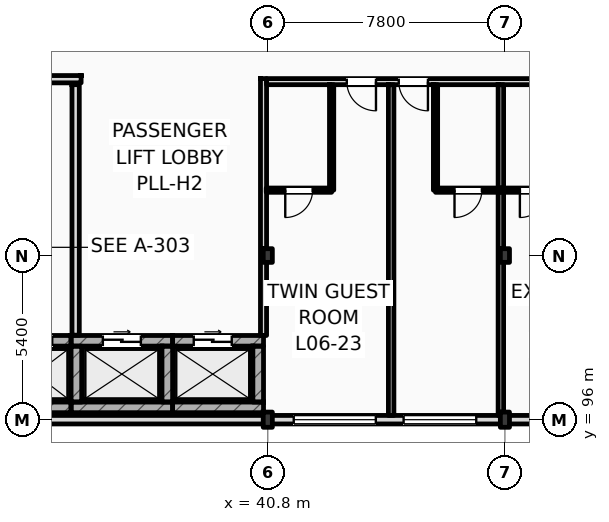
"""IFC4 building model, lengths in metres.
Left out: names, types, materials, properties, quantities, classifications, styles, units other than length and angle.
Written with IfcOpenShell. Run it as: python <this file> out.ifc"""

import sys

from ifc_helpers import new_model, si_unit, direction, frame, frame_2d, origin, origin_2d, place, context, subcontext, project, spatial, rectangle, i_section, extrude, element, fill, save


model = new_model("IFC4")
c1 = context("Model", 3, precision=1e-05, world=origin(), true_north=direction((0.0, 1.0)))
c2 = subcontext(c1, "Body", "Model", "MODEL_VIEW")
j1 = project(units=[si_unit("LENGTHUNIT", "METRE"), si_unit("PLANEANGLEUNIT", "RADIAN")], contexts=[c1])
p1 = place(None, origin())
s1 = spatial("IfcSite", under=j1, at=p1, CompositionType="ELEMENT")
p2 = place(p1, origin())
s2 = spatial("IfcBuilding", under=s1, at=p2, CompositionType="ELEMENT")
p3 = place(p2, frame((0.0, 0.0, 28.2)))
s3 = spatial("IfcBuildingStorey", under=s2, at=p3, CompositionType="ELEMENT", Elevation=28.2)
p4 = place(p3, frame((40.8, 96.0, 0.0), z_axis=(0.0, 0.0, 1.0), x_axis=(1.0, 0.0, 0.0)))
e1 = element("IfcColumn", 1, at=p4, inside=s3, PredefinedType="COLUMN", context=c2, shape_type="SweptSolid", body=[
    extrude(i_section(OverallWidth=0.3, OverallDepth=0.5, WebThickness=0.014, FlangeThickness=0.028, FilletRadius=0.027, at=origin_2d()), origin(), (0.0, 0.0, 1.0), 3.6),
])
p5 = place(p3, frame((40.8, 101.4, 0.0), z_axis=(0.0, 0.0, 1.0), x_axis=(1.0, 0.0, 0.0)))
e2 = element("IfcColumn", 2, at=p5, inside=s3, PredefinedType="COLUMN", context=c2, shape_type="SweptSolid", body=[
    extrude(i_section(OverallWidth=0.3, OverallDepth=0.45, WebThickness=0.014, FlangeThickness=0.026, FilletRadius=0.027, at=origin_2d()), origin(), (0.0, 0.0, 1.0), 3.6),
])
p6 = place(p3, frame((48.6, 96.0, 0.0), z_axis=(0.0, 0.0, 1.0), x_axis=(1.0, 0.0, 0.0)))
e3 = element("IfcColumn", 3, at=p6, inside=s3, PredefinedType="COLUMN", context=c2, shape_type="SweptSolid", body=[
    extrude(i_section(OverallWidth=0.3, OverallDepth=0.5, WebThickness=0.014, FlangeThickness=0.028, FilletRadius=0.027, at=origin_2d()), origin(), (0.0, 0.0, 1.0), 3.6),
])
p7 = place(p3, frame((48.6, 101.4, 0.0), z_axis=(0.0, 0.0, 1.0), x_axis=(1.0, 0.0, 0.0)))
e4 = element("IfcColumn", 4, at=p7, inside=s3, PredefinedType="COLUMN", context=c2, shape_type="SweptSolid", body=[
    extrude(i_section(OverallWidth=0.3, OverallDepth=0.45, WebThickness=0.014, FlangeThickness=0.026, FilletRadius=0.027, at=origin_2d()), origin(), (0.0, 0.0, 1.0), 3.6),
])
p8 = place(p3, frame((25.2, 96.0, 0.0), z_axis=(0.0, 0.0, 1.0), x_axis=(1.0, 0.0, 0.0)))
e5 = element("IfcWall", 5, at=p8, inside=s3, PredefinedType="STANDARD", context=c2, shape_type="SweptSolid", body=[
    extrude(rectangle(XDim=94.8, YDim=0.28, at=frame_2d((47.4, 0.0))), origin(), (0.0, 0.0, 1.0), 2.8),
])
p9 = place(p8, frame((16.454, 0.0, 0.9)))
e6 = element("IfcOpeningElement", 6, at=p9, cuts=e5, PredefinedType="OPENING", context=c2, shape_type="SweptSolid", body=[
    extrude(rectangle(XDim=2.7, YDim=1.72, at=frame_2d((1.35, 0.86))), frame((0.0, 0.15, 0.0), z_axis=(0.0, -1.0, 0.0), x_axis=(1.0, 0.0, 0.0)), (0.0, 0.0, 1.0), 0.3),
])
p10 = place(p8, frame((20.068, 0.0, 0.9)))
e7 = element("IfcOpeningElement", 7, at=p10, cuts=e5, PredefinedType="OPENING", context=c2, shape_type="SweptSolid", body=[
    extrude(rectangle(XDim=2.389, YDim=1.72, at=frame_2d((1.194, 0.86))), frame((0.0, 0.15, 0.0), z_axis=(0.0, -1.0, 0.0), x_axis=(1.0, 0.0, 0.0)), (0.0, 0.0, 1.0), 0.3),
])
p11 = place(p8, frame((24.277, 0.0, 0.9)))
e8 = element("IfcOpeningElement", 8, at=p11, cuts=e5, PredefinedType="OPENING", context=c2, shape_type="SweptSolid", body=[
    extrude(rectangle(XDim=1.8, YDim=1.72, at=frame_2d((0.9, 0.86))), frame((0.0, 0.15, 0.0), z_axis=(0.0, -1.0, 0.0), x_axis=(1.0, 0.0, 0.0)), (0.0, 0.0, 1.0), 0.3),
])
p12 = place(p8, frame((27.885, 0.0, 0.9)))
e9 = element("IfcOpeningElement", 9, at=p12, cuts=e5, PredefinedType="OPENING", context=c2, shape_type="SweptSolid", body=[
    extrude(rectangle(XDim=2.388, YDim=1.72, at=frame_2d((1.194, 0.86))), frame((0.0, 0.15, 0.0), z_axis=(0.0, -1.0, 0.0), x_axis=(1.0, 0.0, 0.0)), (0.0, 0.0, 1.0), 0.3),
])
p13 = place(p8, frame((32.093, 0.0, 0.9)))
e10 = element("IfcOpeningElement", 10, at=p13, cuts=e5, PredefinedType="OPENING", context=c2, shape_type="SweptSolid", body=[
    extrude(rectangle(XDim=1.8, YDim=1.72, at=frame_2d((0.9, 0.86))), frame((0.0, 0.15, 0.0), z_axis=(0.0, -1.0, 0.0), x_axis=(1.0, 0.0, 0.0)), (0.0, 0.0, 1.0), 0.3),
])
p14 = place(p8, frame((35.702, 0.0, 0.9)))
e11 = element("IfcOpeningElement", 11, at=p14, cuts=e5, PredefinedType="OPENING", context=c2, shape_type="SweptSolid", body=[
    extrude(rectangle(XDim=2.488, YDim=1.72, at=frame_2d((1.244, 0.86))), frame((0.0, 0.15, 0.0), z_axis=(0.0, -1.0, 0.0), x_axis=(1.0, 0.0, 0.0)), (0.0, 0.0, 1.0), 0.3),
])
p15 = place(p8, frame((55.56, 0.0, 0.9)))
e12 = element("IfcOpeningElement", 12, at=p15, cuts=e5, PredefinedType="OPENING", context=c2, shape_type="SweptSolid", body=[
    extrude(rectangle(XDim=1.8, YDim=1.72, at=frame_2d((0.9, 0.86))), frame((0.0, 0.15, 0.0), z_axis=(0.0, -1.0, 0.0), x_axis=(1.0, 0.0, 0.0)), (0.0, 0.0, 1.0), 0.3),
])
p16 = place(p8, frame((58.985, 0.0, 0.9)))
e13 = element("IfcOpeningElement", 13, at=p16, cuts=e5, PredefinedType="OPENING", context=c2, shape_type="SweptSolid", body=[
    extrude(rectangle(XDim=1.8, YDim=1.72, at=frame_2d((0.9, 0.86))), frame((0.0, 0.15, 0.0), z_axis=(0.0, -1.0, 0.0), x_axis=(1.0, 0.0, 0.0)), (0.0, 0.0, 1.0), 0.3),
])
p17 = place(p8, frame((63.21, 0.0, 0.9)))
e14 = element("IfcOpeningElement", 14, at=p17, cuts=e5, PredefinedType="OPENING", context=c2, shape_type="SweptSolid", body=[
    extrude(rectangle(XDim=2.525, YDim=1.72, at=frame_2d((1.262, 0.86))), frame((0.0, 0.15, 0.0), z_axis=(0.0, -1.0, 0.0), x_axis=(1.0, 0.0, 0.0)), (0.0, 0.0, 1.0), 0.3),
])
p18 = place(p8, frame((66.955, 0.0, 0.9)))
e15 = element("IfcOpeningElement", 15, at=p18, cuts=e5, PredefinedType="OPENING", context=c2, shape_type="SweptSolid", body=[
    extrude(rectangle(XDim=1.8, YDim=1.72, at=frame_2d((0.9, 0.86))), frame((0.0, 0.15, 0.0), z_axis=(0.0, -1.0, 0.0), x_axis=(1.0, 0.0, 0.0)), (0.0, 0.0, 1.0), 0.3),
])
p19 = place(p8, frame((71.892, 0.0, 0.9)))
e16 = element("IfcOpeningElement", 16, at=p19, cuts=e5, PredefinedType="OPENING", context=c2, shape_type="SweptSolid", body=[
    extrude(rectangle(XDim=1.1, YDim=1.5, at=frame_2d((0.55, 0.75))), frame((0.0, 0.15, 0.0), z_axis=(0.0, -1.0, 0.0), x_axis=(1.0, 0.0, 0.0)), (0.0, 0.0, 1.0), 0.3),
])
p20 = place(p8, frame((75.802, 0.0, 0.9)))
e17 = element("IfcOpeningElement", 17, at=p20, cuts=e5, PredefinedType="OPENING", context=c2, shape_type="SweptSolid", body=[
    extrude(rectangle(XDim=1.25, YDim=1.6, at=frame_2d((0.625, 0.8))), frame((0.0, 0.15, 0.0), z_axis=(0.0, -1.0, 0.0), x_axis=(1.0, 0.0, 0.0)), (0.0, 0.0, 1.0), 0.3),
])
p21 = place(p8, frame((79.712, 0.0, 0.9)))
e18 = element("IfcOpeningElement", 18, at=p21, cuts=e5, PredefinedType="OPENING", context=c2, shape_type="SweptSolid", body=[
    extrude(rectangle(XDim=1.4, YDim=1.7, at=frame_2d((0.7, 0.85))), frame((0.0, 0.15, 0.0), z_axis=(0.0, -1.0, 0.0), x_axis=(1.0, 0.0, 0.0)), (0.0, 0.0, 1.0), 0.3),
])
p22 = place(p8, frame((83.597, 0.0, 0.9)))
e19 = element("IfcOpeningElement", 19, at=p22, cuts=e5, PredefinedType="OPENING", context=c2, shape_type="SweptSolid", body=[
    extrude(rectangle(XDim=1.6, YDim=1.72, at=frame_2d((0.8, 0.86))), frame((0.0, 0.15, 0.0), z_axis=(0.0, -1.0, 0.0), x_axis=(1.0, 0.0, 0.0)), (0.0, 0.0, 1.0), 0.3),
])
p23 = place(p8, frame((87.507, 0.0, 0.9)))
e20 = element("IfcOpeningElement", 20, at=p23, cuts=e5, PredefinedType="OPENING", context=c2, shape_type="SweptSolid", body=[
    extrude(rectangle(XDim=1.75, YDim=1.72, at=frame_2d((0.875, 0.86))), frame((0.0, 0.15, 0.0), z_axis=(0.0, -1.0, 0.0), x_axis=(1.0, 0.0, 0.0)), (0.0, 0.0, 1.0), 0.3),
])
p24 = place(p8, frame((91.328, 0.0, 0.9)))
e21 = element("IfcOpeningElement", 21, at=p24, cuts=e5, PredefinedType="OPENING", context=c2, shape_type="SweptSolid", body=[
    extrude(rectangle(XDim=2.0, YDim=1.72, at=frame_2d((1.0, 0.86))), frame((0.0, 0.15, 0.0), z_axis=(0.0, -1.0, 0.0), x_axis=(1.0, 0.0, 0.0)), (0.0, 0.0, 1.0), 0.3),
])
p25 = place(p3, frame((31.64, 98.595, 0.0), z_axis=(0.0, 0.0, 1.0), x_axis=(1.0, 0.0, 0.0)))
e22 = element("IfcWall", 22, at=p25, inside=s3, PredefinedType="SHEAR", context=c2, shape_type="SweptSolid", body=[
    extrude(rectangle(XDim=2.69, YDim=0.35, at=frame_2d((1.345, 0.0))), origin(), (0.0, 0.0, 1.0), 3.36),
])
p26 = place(p25, frame((0.97, 0.0, 0.0)))
e23 = element("IfcOpeningElement", 23, at=p26, cuts=e22, PredefinedType="OPENING", context=c2, shape_type="SweptSolid", body=[
    extrude(rectangle(XDim=1.1, YDim=2.2, at=frame_2d((0.55, 1.1))), frame((0.0, 0.185, 0.0), z_axis=(0.0, -1.0, 0.0), x_axis=(1.0, 0.0, 0.0)), (0.0, 0.0, 1.0), 0.37),
])
p27 = place(p3, frame((31.64, 96.405, 0.0), z_axis=(0.0, 0.0, 1.0), x_axis=(1.0, 0.0, 0.0)))
e24 = element("IfcWall", 24, at=p27, inside=s3, PredefinedType="SHEAR", context=c2, shape_type="SweptSolid", body=[
    extrude(rectangle(XDim=2.69, YDim=0.35, at=frame_2d((1.345, 0.0))), origin(), (0.0, 0.0, 1.0), 3.36),
])
p28 = place(p3, frame((34.33, 98.595, 0.0), z_axis=(0.0, 0.0, 1.0), x_axis=(1.0, 0.0, 0.0)))
e25 = element("IfcWall", 25, at=p28, inside=s3, PredefinedType="SHEAR", context=c2, shape_type="SweptSolid", body=[
    extrude(rectangle(XDim=3.34, YDim=0.35, at=frame_2d((1.67, 0.0))), origin(), (0.0, 0.0, 1.0), 3.36),
])
p29 = place(p28, frame((1.045, 0.0, 0.0)))
e26 = element("IfcOpeningElement", 26, at=p29, cuts=e25, PredefinedType="OPENING", context=c2, shape_type="SweptSolid", body=[
    extrude(rectangle(XDim=1.25, YDim=2.25, at=frame_2d((0.625, 1.125))), frame((0.0, 0.185, 0.0), z_axis=(0.0, -1.0, 0.0), x_axis=(1.0, 0.0, 0.0)), (0.0, 0.0, 1.0), 0.37),
])
p30 = place(p3, frame((34.33, 96.405, 0.0), z_axis=(0.0, 0.0, 1.0), x_axis=(1.0, 0.0, 0.0)))
e27 = element("IfcWall", 27, at=p30, inside=s3, PredefinedType="SHEAR", context=c2, shape_type="SweptSolid", body=[
    extrude(rectangle(XDim=3.34, YDim=0.35, at=frame_2d((1.67, 0.0))), origin(), (0.0, 0.0, 1.0), 3.36),
])
for number, where, z_axis, x_axis in (
    (28, (34.505, 96.58, 0.0), (0.0, 0.0, 1.0), (0.0, 1.0, 0.0)),
    (29, (37.495, 96.58, 0.0), (0.0, 0.0, 1.0), (0.0, 1.0, 0.0)),
):
    element("IfcWall", number, at=place(p3, frame(where, z_axis=z_axis, x_axis=x_axis)), inside=s3, PredefinedType="SHEAR", context=c2, shape_type="SweptSolid", body=[
        extrude(rectangle(XDim=1.84, YDim=0.35, at=frame_2d((0.92, 0.0))), origin(), (0.0, 0.0, 1.0), 3.36),
    ])
p31 = place(p3, frame((37.67, 98.595, 0.0), z_axis=(0.0, 0.0, 1.0), x_axis=(1.0, 0.0, 0.0)))
e30 = element("IfcWall", 30, at=p31, inside=s3, PredefinedType="SHEAR", context=c2, shape_type="SweptSolid", body=[
    extrude(rectangle(XDim=2.99, YDim=0.35, at=frame_2d((1.495, 0.0))), origin(), (0.0, 0.0, 1.0), 3.36),
])
p32 = place(p31, frame((0.695, 0.0, 0.0)))
e31 = element("IfcOpeningElement", 31, at=p32, cuts=e30, PredefinedType="OPENING", context=c2, shape_type="SweptSolid", body=[
    extrude(rectangle(XDim=1.25, YDim=2.25, at=frame_2d((0.625, 1.125))), frame((0.0, 0.185, 0.0), z_axis=(0.0, -1.0, 0.0), x_axis=(1.0, 0.0, 0.0)), (0.0, 0.0, 1.0), 0.37),
])
p33 = place(p3, frame((37.67, 96.405, 0.0), z_axis=(0.0, 0.0, 1.0), x_axis=(1.0, 0.0, 0.0)))
e32 = element("IfcWall", 32, at=p33, inside=s3, PredefinedType="SHEAR", context=c2, shape_type="SweptSolid", body=[
    extrude(rectangle(XDim=2.99, YDim=0.35, at=frame_2d((1.495, 0.0))), origin(), (0.0, 0.0, 1.0), 3.36),
])
p34 = place(p3, frame((40.485, 96.58, 0.0), z_axis=(0.0, 0.0, 1.0), x_axis=(0.0, 1.0, 0.0)))
e33 = element("IfcWall", 33, at=p34, inside=s3, PredefinedType="SHEAR", context=c2, shape_type="SweptSolid", body=[
    extrude(rectangle(XDim=1.84, YDim=0.35, at=frame_2d((0.92, 0.0))), origin(), (0.0, 0.0, 1.0), 2.99),
])
p35 = place(p3, frame((34.48, 98.78, 0.0), z_axis=(0.0, 0.0, 1.0), x_axis=(0.0, 1.0, 0.0)))
e34 = element("IfcWall", 34, at=p35, inside=s3, PredefinedType="STANDARD", context=c2, shape_type="SweptSolid", body=[
    extrude(rectangle(XDim=8.24, YDim=0.24, at=frame_2d((4.12, 0.0))), origin(), (0.0, 0.0, 1.0), 3.36),
])
p36 = place(p3, frame((30.56, 107.2, 0.0), z_axis=(0.0, 0.0, 1.0), x_axis=(1.0, 0.0, 0.0)))
e35 = element("IfcWall", 35, at=p36, inside=s3, PredefinedType="STANDARD", context=c2, shape_type="SweptSolid", body=[
    extrude(rectangle(XDim=4.1, YDim=0.24, at=frame_2d((2.05, 0.0))), origin(), (0.0, 0.0, 1.0), 3.36),
])
p37 = place(p36, frame((1.3, 0.0, 0.0)))
e36 = element("IfcOpeningElement", 36, at=p37, cuts=e35, PredefinedType="OPENING", context=c2, shape_type="SweptSolid", body=[
    extrude(rectangle(XDim=1.1, YDim=2.2, at=frame_2d((0.55, 1.1))), frame((0.0, 0.13, 0.0), z_axis=(0.0, -1.0, 0.0), x_axis=(1.0, 0.0, 0.0)), (0.0, 0.0, 1.0), 0.26),
])
p38 = place(p3, frame((40.76, 107.12, 0.0), z_axis=(0.0, 0.0, 1.0), x_axis=(1.0, 0.0, 0.0)))
e37 = element("IfcWall", 37, at=p38, inside=s3, PredefinedType="PARTITIONING", context=c2, shape_type="SweptSolid", body=[
    extrude(rectangle(XDim=23.44, YDim=0.2, at=frame_2d((11.72, 0.0))), origin(), (0.0, 0.0, 1.0), 3.36),
])
p39 = place(p38, frame((2.639, 0.0, 0.0)))
e38 = element("IfcOpeningElement", 38, at=p39, cuts=e37, PredefinedType="OPENING", context=c2, shape_type="SweptSolid", body=[
    extrude(rectangle(XDim=0.96, YDim=2.2, at=frame_2d((0.48, 1.1))), frame((0.0, 0.11, 0.0), z_axis=(0.0, -1.0, 0.0), x_axis=(1.0, 0.0, 0.0)), (0.0, 0.0, 1.0), 0.22),
])
p40 = place(p38, frame((4.348, 0.0, 0.0)))
e39 = element("IfcOpeningElement", 39, at=p40, cuts=e37, PredefinedType="OPENING", context=c2, shape_type="SweptSolid", body=[
    extrude(rectangle(XDim=0.96, YDim=2.2, at=frame_2d((0.48, 1.1))), frame((0.0, 0.11, 0.0), z_axis=(0.0, -1.0, 0.0), x_axis=(1.0, 0.0, 0.0)), (0.0, 0.0, 1.0), 0.22),
])
p41 = place(p38, frame((10.406, 0.0, 0.0)))
e40 = element("IfcOpeningElement", 40, at=p41, cuts=e37, PredefinedType="OPENING", context=c2, shape_type="SweptSolid", body=[
    extrude(rectangle(XDim=0.96, YDim=2.2, at=frame_2d((0.48, 1.1))), frame((0.0, 0.11, 0.0), z_axis=(0.0, -1.0, 0.0), x_axis=(1.0, 0.0, 0.0)), (0.0, 0.0, 1.0), 0.22),
])
p42 = place(p38, frame((12.164, 0.0, 0.0)))
e41 = element("IfcOpeningElement", 41, at=p42, cuts=e37, PredefinedType="OPENING", context=c2, shape_type="SweptSolid", body=[
    extrude(rectangle(XDim=0.96, YDim=2.2, at=frame_2d((0.48, 1.1))), frame((0.0, 0.11, 0.0), z_axis=(0.0, -1.0, 0.0), x_axis=(1.0, 0.0, 0.0)), (0.0, 0.0, 1.0), 0.22),
])
p43 = place(p38, frame((18.223, 0.0, 0.0)))
e42 = element("IfcOpeningElement", 42, at=p43, cuts=e37, PredefinedType="OPENING", context=c2, shape_type="SweptSolid", body=[
    extrude(rectangle(XDim=0.96, YDim=2.2, at=frame_2d((0.48, 1.1))), frame((0.0, 0.11, 0.0), z_axis=(0.0, -1.0, 0.0), x_axis=(1.0, 0.0, 0.0)), (0.0, 0.0, 1.0), 0.22),
])
p44 = place(p38, frame((20.031, 0.0, 0.0)))
e43 = element("IfcOpeningElement", 43, at=p44, cuts=e37, PredefinedType="OPENING", context=c2, shape_type="SweptSolid", body=[
    extrude(rectangle(XDim=0.96, YDim=2.2, at=frame_2d((0.48, 1.1))), frame((0.0, 0.11, 0.0), z_axis=(0.0, -1.0, 0.0), x_axis=(1.0, 0.0, 0.0)), (0.0, 0.0, 1.0), 0.22),
])
p45 = place(p3, frame((40.66, 98.77, 0.0), z_axis=(0.0, 0.0, 1.0), x_axis=(0.0, 1.0, 0.0)))
e44 = element("IfcWall", 44, at=p45, inside=s3, PredefinedType="PARTITIONING", context=c2, shape_type="SweptSolid", body=[
    extrude(rectangle(XDim=8.45, YDim=0.2, at=frame_2d((4.225, 0.0))), origin(), (0.0, 0.0, 1.0), 2.99),
])
p46 = place(p3, frame((44.858, 96.14, 0.0), z_axis=(0.0, 0.0, 1.0), x_axis=(0.0, 1.0, 0.0)))
e45 = element("IfcWall", 45, at=p46, inside=s3, PredefinedType="PARTITIONING", context=c2, shape_type="SweptSolid", body=[
    extrude(rectangle(XDim=10.88, YDim=0.18, at=frame_2d((5.44, 0.0))), origin(), (0.0, 0.0, 1.0), 3.36),
])
p47 = place(p3, frame((42.9, 103.55, 0.0), z_axis=(0.0, 0.0, 1.0), x_axis=(0.0, 1.0, 0.0)))
e46 = element("IfcWall", 46, at=p47, inside=s3, PredefinedType="PARTITIONING", context=c2, shape_type="SweptSolid", body=[
    extrude(rectangle(XDim=3.47, YDim=0.14, at=frame_2d((1.735, 0.0))), origin(), (0.0, 0.0, 1.0), 3.36),
])
p48 = place(p3, frame((40.75, 103.55, 0.0), z_axis=(0.0, 0.0, 1.0), x_axis=(1.0, 0.0, 0.0)))
e47 = element("IfcWall", 47, at=p48, inside=s3, PredefinedType="PARTITIONING", context=c2, shape_type="SweptSolid", body=[
    extrude(rectangle(XDim=2.15, YDim=0.14, at=frame_2d((1.075, 0.0))), origin(), (0.0, 0.0, 1.0), 3.36),
])
p49 = place(p48, frame((0.625, 0.0, 0.0)))
e48 = element("IfcOpeningElement", 48, at=p49, cuts=e47, PredefinedType="OPENING", context=c2, shape_type="SweptSolid", body=[
    extrude(rectangle(XDim=0.9, YDim=2.1, at=frame_2d((0.45, 1.05))), frame((0.0, 0.08, 0.0), z_axis=(0.0, -1.0, 0.0), x_axis=(1.0, 0.0, 0.0)), (0.0, 0.0, 1.0), 0.16),
])
p50 = place(p3, frame((48.467, 96.14, 0.0), z_axis=(0.0, 0.0, 1.0), x_axis=(0.0, 1.0, 0.0)))
e49 = element("IfcWall", 49, at=p50, inside=s3, PredefinedType="PARTITIONING", context=c2, shape_type="SweptSolid", body=[
    extrude(rectangle(XDim=10.88, YDim=0.18, at=frame_2d((5.44, 0.0))), origin(), (0.0, 0.0, 1.0), 2.99),
])
p51 = place(p3, frame((46.317, 103.55, 0.0), z_axis=(0.0, 0.0, 1.0), x_axis=(0.0, 1.0, 0.0)))
e50 = element("IfcWall", 50, at=p51, inside=s3, PredefinedType="PARTITIONING", context=c2, shape_type="SweptSolid", body=[
    extrude(rectangle(XDim=3.47, YDim=0.14, at=frame_2d((1.735, 0.0))), origin(), (0.0, 0.0, 1.0), 3.36),
])
p52 = place(p3, frame((46.317, 103.55, 0.0), z_axis=(0.0, 0.0, 1.0), x_axis=(1.0, 0.0, 0.0)))
e51 = element("IfcWall", 51, at=p52, inside=s3, PredefinedType="PARTITIONING", context=c2, shape_type="SweptSolid", body=[
    extrude(rectangle(XDim=2.15, YDim=0.14, at=frame_2d((1.075, 0.0))), origin(), (0.0, 0.0, 1.0), 3.36),
])
p53 = place(p52, frame((0.625, 0.0, 0.0)))
e52 = element("IfcOpeningElement", 52, at=p53, cuts=e51, PredefinedType="OPENING", context=c2, shape_type="SweptSolid", body=[
    extrude(rectangle(XDim=0.9, YDim=2.1, at=frame_2d((0.45, 1.05))), frame((0.0, 0.08, 0.0), z_axis=(0.0, -1.0, 0.0), x_axis=(1.0, 0.0, 0.0)), (0.0, 0.0, 1.0), 0.16),
])
p54 = place(p3, frame((48.467, 103.55, 0.0), z_axis=(0.0, 0.0, 1.0), x_axis=(1.0, 0.0, 0.0)))
e53 = element("IfcWall", 53, at=p54, inside=s3, PredefinedType="PARTITIONING", context=c2, shape_type="SweptSolid", body=[
    extrude(rectangle(XDim=2.15, YDim=0.14, at=frame_2d((1.075, 0.0))), origin(), (0.0, 0.0, 1.0), 3.36),
])
p55 = place(p54, frame((0.625, 0.0, 0.0)))
e54 = element("IfcOpeningElement", 54, at=p55, cuts=e53, PredefinedType="OPENING", context=c2, shape_type="SweptSolid", body=[
    extrude(rectangle(XDim=0.9, YDim=2.1, at=frame_2d((0.45, 1.05))), frame((0.0, 0.08, 0.0), z_axis=(0.0, -1.0, 0.0), x_axis=(1.0, 0.0, 0.0)), (0.0, 0.0, 1.0), 0.16),
])
p56 = place(p9, origin())
e55 = element("IfcWindow", 55, at=p56, inside=s3, PartitioningType="DOUBLE_PANEL_VERTICAL", PredefinedType="WINDOW", context=c2, shape_type="SweptSolid", body=[
    extrude(rectangle(XDim=2.7, YDim=1.72, at=frame_2d((1.35, 0.86))), frame((0.0, 0.03, 0.0), z_axis=(0.0, -1.0, 0.0), x_axis=(1.0, 0.0, 0.0)), (0.0, 0.0, 1.0), 0.06),
])
fill(e6, e55)
p57 = place(p10, origin())
e56 = element("IfcWindow", 56, at=p57, inside=s3, PartitioningType="DOUBLE_PANEL_VERTICAL", PredefinedType="WINDOW", context=c2, shape_type="SweptSolid", body=[
    extrude(rectangle(XDim=2.389, YDim=1.72, at=frame_2d((1.194, 0.86))), frame((0.0, 0.03, 0.0), z_axis=(0.0, -1.0, 0.0), x_axis=(1.0, 0.0, 0.0)), (0.0, 0.0, 1.0), 0.06),
])
fill(e7, e56)
p58 = place(p26, origin())
e57 = element("IfcDoor", 57, at=p58, inside=s3, OperationType="SLIDING_TO_LEFT", PredefinedType="DOOR", context=c2, shape_type="SweptSolid", body=[
    extrude(rectangle(XDim=1.1, YDim=2.2, at=frame_2d((0.55, 1.1))), frame((0.0, 0.025, 0.0), z_axis=(0.0, -1.0, 0.0), x_axis=(1.0, 0.0, 0.0)), (0.0, 0.0, 1.0), 0.05),
])
fill(e23, e57)
p59 = place(p29, origin())
e58 = element("IfcDoor", 58, at=p59, inside=s3, OperationType="SLIDING_TO_LEFT", PredefinedType="DOOR", context=c2, shape_type="SweptSolid", body=[
    extrude(rectangle(XDim=1.25, YDim=2.25, at=frame_2d((0.625, 1.125))), frame((0.0, 0.025, 0.0), z_axis=(0.0, -1.0, 0.0), x_axis=(1.0, 0.0, 0.0)), (0.0, 0.0, 1.0), 0.05),
])
fill(e26, e58)
p60 = place(p32, origin())
e59 = element("IfcDoor", 59, at=p60, inside=s3, OperationType="SLIDING_TO_LEFT", PredefinedType="DOOR", context=c2, shape_type="SweptSolid", body=[
    extrude(rectangle(XDim=1.25, YDim=2.25, at=frame_2d((0.625, 1.125))), frame((0.0, 0.025, 0.0), z_axis=(0.0, -1.0, 0.0), x_axis=(1.0, 0.0, 0.0)), (0.0, 0.0, 1.0), 0.05),
])
fill(e31, e59)
p61 = place(p39, frame((0.96, 0.0, 0.0), z_axis=(0.0, 0.0, 1.0), x_axis=(-1.0, 0.0, 0.0)))
e60 = element("IfcDoor", 60, at=p61, inside=s3, OperationType="SINGLE_SWING_RIGHT", PredefinedType="DOOR", context=c2, shape_type="SweptSolid", body=[
    extrude(rectangle(XDim=0.96, YDim=2.2, at=frame_2d((0.48, 1.1))), frame((0.0, 0.025, 0.0), z_axis=(0.0, -1.0, 0.0), x_axis=(1.0, 0.0, 0.0)), (0.0, 0.0, 1.0), 0.05),
])
fill(e38, e60)
p62 = place(p49, frame((0.9, 0.0, 0.0), z_axis=(0.0, 0.0, 1.0), x_axis=(-1.0, 0.0, 0.0)))
e61 = element("IfcDoor", 61, at=p62, inside=s3, OperationType="SINGLE_SWING_LEFT", PredefinedType="DOOR", context=c2, shape_type="SweptSolid", body=[
    extrude(rectangle(XDim=0.9, YDim=2.1, at=frame_2d((0.45, 1.05))), frame((0.0, 0.025, 0.0), z_axis=(0.0, -1.0, 0.0), x_axis=(1.0, 0.0, 0.0)), (0.0, 0.0, 1.0), 0.05),
])
fill(e48, e61)
p63 = place(p40, frame((0.96, 0.0, 0.0), z_axis=(0.0, 0.0, 1.0), x_axis=(-1.0, 0.0, 0.0)))
e62 = element("IfcDoor", 62, at=p63, inside=s3, OperationType="SINGLE_SWING_RIGHT", PredefinedType="DOOR", context=c2, shape_type="SweptSolid", body=[
    extrude(rectangle(XDim=0.96, YDim=2.2, at=frame_2d((0.48, 1.1))), frame((0.0, 0.025, 0.0), z_axis=(0.0, -1.0, 0.0), x_axis=(1.0, 0.0, 0.0)), (0.0, 0.0, 1.0), 0.05),
])
fill(e39, e62)
p64 = place(p53, frame((0.9, 0.0, 0.0), z_axis=(0.0, 0.0, 1.0), x_axis=(-1.0, 0.0, 0.0)))
e63 = element("IfcDoor", 63, at=p64, inside=s3, OperationType="SINGLE_SWING_LEFT", PredefinedType="DOOR", context=c2, shape_type="SweptSolid", body=[
    extrude(rectangle(XDim=0.9, YDim=2.1, at=frame_2d((0.45, 1.05))), frame((0.0, 0.025, 0.0), z_axis=(0.0, -1.0, 0.0), x_axis=(1.0, 0.0, 0.0)), (0.0, 0.0, 1.0), 0.05),
])
fill(e52, e63)
p65 = place(p55, frame((0.9, 0.0, 0.0), z_axis=(0.0, 0.0, 1.0), x_axis=(-1.0, 0.0, 0.0)))
e64 = element("IfcDoor", 64, at=p65, inside=s3, OperationType="SINGLE_SWING_LEFT", PredefinedType="DOOR", context=c2, shape_type="SweptSolid", body=[
    extrude(rectangle(XDim=0.9, YDim=2.1, at=frame_2d((0.45, 1.05))), frame((0.0, 0.025, 0.0), z_axis=(0.0, -1.0, 0.0), x_axis=(1.0, 0.0, 0.0)), (0.0, 0.0, 1.0), 0.05),
])
fill(e54, e64)
save(model, sys.argv[1])
